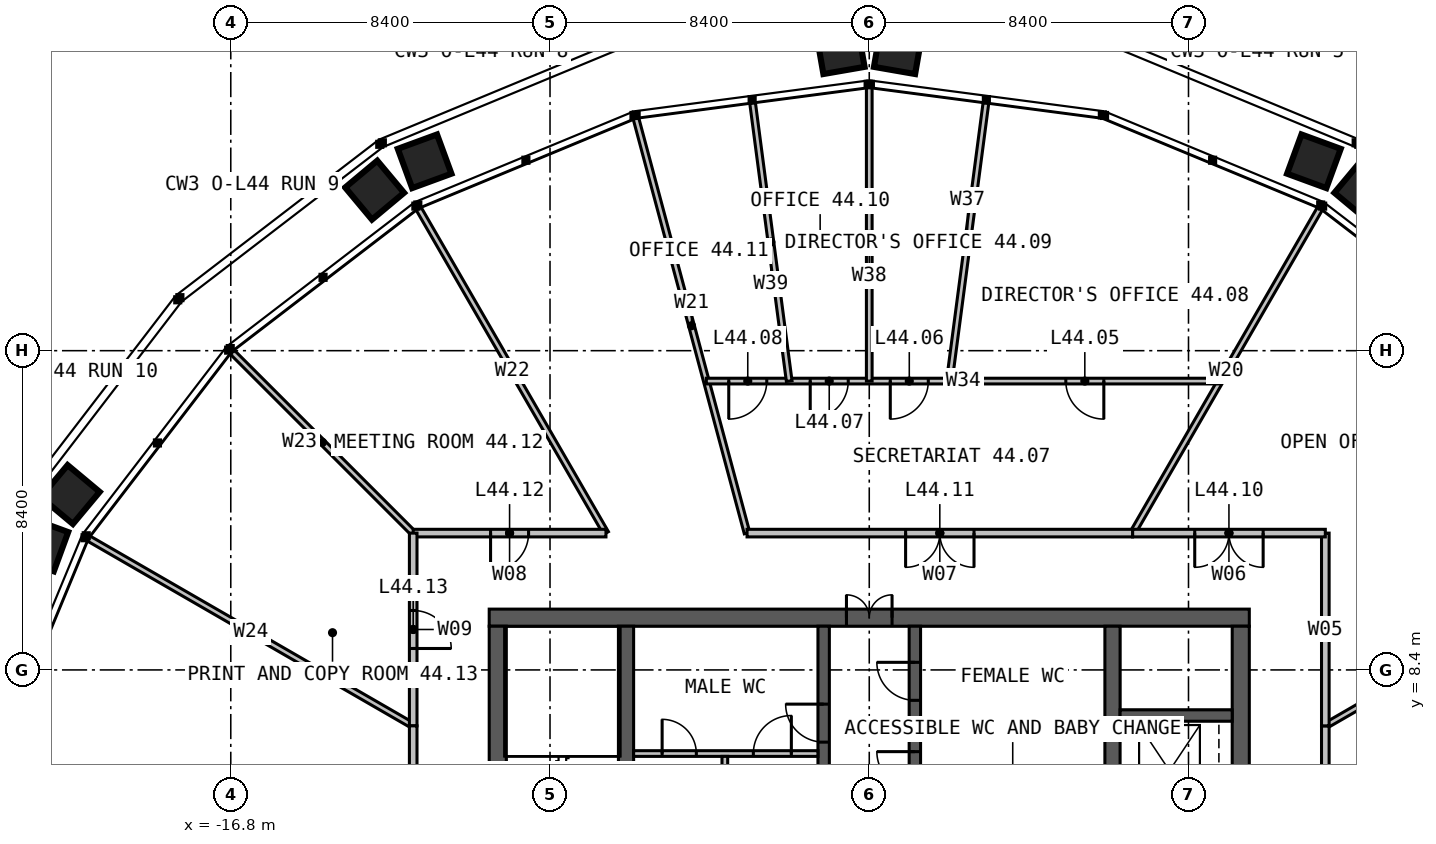
"""IFC4 building model, lengths in metres.
Left out: names, types, materials, properties, quantities, classifications, styles, units other than length and angle.
Written with IfcOpenShell. Run it as: python <this file> out.ifc"""

import sys

from ifc_helpers import new_model, si_unit, direction, frame, frame_2d, origin, place, context, subcontext, project, spatial, rectangle, extrude, element, fill, save


model = new_model("IFC4")
c1 = context("Model", 3, precision=1e-05, world=origin(), true_north=direction((0.0, 1.0)))
c2 = subcontext(c1, "Body", "Model", "MODEL_VIEW")
j1 = project(units=[si_unit("LENGTHUNIT", "METRE"), si_unit("PLANEANGLEUNIT", "RADIAN")], contexts=[c1])
p1 = place(None, origin())
s1 = spatial("IfcSite", under=j1, at=p1, CompositionType="ELEMENT")
p2 = place(p1, origin())
s2 = spatial("IfcBuilding", under=s1, at=p2, CompositionType="ELEMENT")
p3 = place(p2, frame((0.0, 0.0, 183.0)))
s3 = spatial("IfcBuildingStorey", under=s2, at=p3, CompositionType="ELEMENT", Elevation=183.0)
p4 = place(p3, frame((-10.0, 9.775, 0.0), z_axis=(0.0, 0.0, 1.0), x_axis=(1.0, 0.0, 0.0)))
e1 = element("IfcWall", 1, at=p4, inside=s3, PredefinedType="SOLIDWALL", context=c2, shape_type="SweptSolid", body=[
    extrude(rectangle(XDim=20.0, YDim=0.45, at=frame_2d((10.0, 0.0))), origin(), (0.0, 0.0, 1.0), 4.0),
])
p5 = place(p4, frame((9.4, 0.0, 0.0)))
e2 = element("IfcOpeningElement", 2, at=p5, cuts=e1, PredefinedType="OPENING", context=c2, shape_type="SweptSolid", body=[
    extrude(rectangle(XDim=1.2, YDim=2.2, at=frame_2d((0.6, 1.1))), frame((0.0, 0.235, 0.0), z_axis=(0.0, -1.0, 0.0), x_axis=(1.0, 0.0, 0.0)), (0.0, 0.0, 1.0), 0.47),
])
for number, where, z_axis, x_axis in (
    (3, (9.775, -9.55, 0.0), (0.0, 0.0, 1.0), (0.0, 1.0, 0.0)),
    (4, (-9.775, 9.55, 0.0), (0.0, 0.0, 1.0), (0.0, -1.0, 0.0)),
):
    element("IfcWall", number, at=place(p3, frame(where, z_axis=z_axis, x_axis=x_axis)), inside=s3, PredefinedType="SOLIDWALL", context=c2, shape_type="SweptSolid", body=[
        extrude(rectangle(XDim=19.1, YDim=0.45, at=frame_2d((9.55, 0.0))), origin(), (0.0, 0.0, 1.0), 4.0),
    ])
p6 = place(p3, frame((-6.4, -9.55, 0.0), z_axis=(0.0, 0.0, 1.0), x_axis=(0.0, 1.0, 0.0)))
e5 = element("IfcWall", 5, at=p6, inside=s3, PredefinedType="SOLIDWALL", context=c2, shape_type="SweptSolid", body=[
    extrude(rectangle(XDim=19.1, YDim=0.4, at=frame_2d((9.55, 0.0))), origin(), (0.0, 0.0, 1.0), 4.0),
])
p7 = place(p6, frame((9.05, 0.0, 0.0)))
e6 = element("IfcOpeningElement", 6, at=p7, cuts=e5, PredefinedType="OPENING", context=c2, shape_type="SweptSolid", body=[
    extrude(rectangle(XDim=1.0, YDim=2.2, at=frame_2d((0.5, 1.1))), frame((0.0, 0.21, 0.0), z_axis=(0.0, -1.0, 0.0), x_axis=(1.0, 0.0, 0.0)), (0.0, 0.0, 1.0), 0.42),
])
p8 = place(p3, frame((6.4, 9.55, 0.0), z_axis=(0.0, 0.0, 1.0), x_axis=(0.0, -1.0, 0.0)))
e7 = element("IfcWall", 7, at=p8, inside=s3, PredefinedType="SOLIDWALL", context=c2, shape_type="SweptSolid", body=[
    extrude(rectangle(XDim=19.1, YDim=0.4, at=frame_2d((9.55, 0.0))), origin(), (0.0, 0.0, 1.0), 4.0),
])
p9 = place(p8, frame((9.05, 0.0, 0.0)))
e8 = element("IfcOpeningElement", 8, at=p9, cuts=e7, PredefinedType="OPENING", context=c2, shape_type="SweptSolid", body=[
    extrude(rectangle(XDim=1.0, YDim=2.2, at=frame_2d((0.5, 1.1))), frame((0.0, 0.21, 0.0), z_axis=(0.0, -1.0, 0.0), x_axis=(1.0, 0.0, 0.0)), (0.0, 0.0, 1.0), 0.42),
])
p10 = place(p3, frame((-1.2, 1.45, 0.0), z_axis=(0.0, 0.0, 1.0), x_axis=(0.0, 1.0, 0.0)))
e9 = element("IfcWall", 9, at=p10, inside=s3, PredefinedType="SOLIDWALL", context=c2, shape_type="SweptSolid", body=[
    extrude(rectangle(XDim=8.1, YDim=0.3, at=frame_2d((4.05, 0.0))), origin(), (0.0, 0.0, 1.0), 4.0),
])
p11 = place(p10, frame((5.05, 0.0, 0.0)))
e10 = element("IfcOpeningElement", 10, at=p11, cuts=e9, PredefinedType="OPENING", context=c2, shape_type="SweptSolid", body=[
    extrude(rectangle(XDim=1.0, YDim=2.2, at=frame_2d((0.5, 1.1))), frame((0.0, 0.16, 0.0), z_axis=(0.0, -1.0, 0.0), x_axis=(1.0, 0.0, 0.0)), (0.0, 0.0, 1.0), 0.32),
])
p12 = place(p3, frame((1.2, 1.45, 0.0), z_axis=(0.0, 0.0, 1.0), x_axis=(0.0, 1.0, 0.0)))
e11 = element("IfcWall", 11, at=p12, inside=s3, PredefinedType="SOLIDWALL", context=c2, shape_type="SweptSolid", body=[
    extrude(rectangle(XDim=8.1, YDim=0.3, at=frame_2d((4.05, 0.0))), origin(), (0.0, 0.0, 1.0), 4.0),
])
p13 = place(p12, frame((3.8, 0.0, 0.0)))
e12 = element("IfcOpeningElement", 12, at=p13, cuts=e11, PredefinedType="OPENING", context=c2, shape_type="SweptSolid", body=[
    extrude(rectangle(XDim=1.0, YDim=2.2, at=frame_2d((0.5, 1.1))), frame((0.0, 0.16, 0.0), z_axis=(0.0, -1.0, 0.0), x_axis=(1.0, 0.0, 0.0)), (0.0, 0.0, 1.0), 0.32),
])
p14 = place(p12, frame((6.15, 0.0, 0.0)))
e13 = element("IfcOpeningElement", 13, at=p14, cuts=e11, PredefinedType="OPENING", context=c2, shape_type="SweptSolid", body=[
    extrude(rectangle(XDim=1.0, YDim=2.2, at=frame_2d((0.5, 1.1))), frame((0.0, 0.16, 0.0), z_axis=(0.0, -1.0, 0.0), x_axis=(1.0, 0.0, 0.0)), (0.0, 0.0, 1.0), 0.32),
])
p15 = place(p3, frame((6.6, 7.2, 0.0), z_axis=(0.0, 0.0, 1.0), x_axis=(1.0, 0.0, 0.0)))
e14 = element("IfcWall", 14, at=p15, inside=s3, PredefinedType="SOLIDWALL", context=c2, shape_type="SweptSolid", body=[
    extrude(rectangle(XDim=2.95, YDim=0.3, at=frame_2d((1.475, 0.0))), origin(), (0.0, 0.0, 1.0), 4.0),
])
p16 = place(p3, frame((1.35, 6.8, 0.0), z_axis=(0.0, 0.0, 1.0), x_axis=(1.0, 0.0, 0.0)))
e15 = element("IfcWall", 15, at=p16, inside=s3, PredefinedType="PARTITIONING", context=c2, shape_type="SweptSolid", body=[
    extrude(rectangle(XDim=4.85, YDim=0.15, at=frame_2d((2.425, 0.0))), origin(), (0.0, 0.0, 1.0), 3.75),
])
p17 = place(p3, frame((-6.2, 6.2, 0.0), z_axis=(0.0, 0.0, 1.0), x_axis=(1.0, 0.0, 0.0)))
e16 = element("IfcWall", 16, at=p17, inside=s3, PredefinedType="PARTITIONING", context=c2, shape_type="SweptSolid", body=[
    extrude(rectangle(XDim=4.85, YDim=0.15, at=frame_2d((2.425, 0.0))), origin(), (0.0, 0.0, 1.0), 3.75),
])
p18 = place(p17, frame((3.15, 0.0, 0.0)))
e17 = element("IfcOpeningElement", 17, at=p18, cuts=e16, PredefinedType="OPENING", context=c2, shape_type="SweptSolid", body=[
    extrude(rectangle(XDim=1.0, YDim=2.2, at=frame_2d((0.5, 1.1))), frame((0.0, 0.085, 0.0), z_axis=(0.0, -1.0, 0.0), x_axis=(1.0, 0.0, 0.0)), (0.0, 0.0, 1.0), 0.17),
])
p19 = place(p17, frame((0.75, 0.0, 0.0)))
e18 = element("IfcOpeningElement", 18, at=p19, cuts=e16, PredefinedType="OPENING", context=c2, shape_type="SweptSolid", body=[
    extrude(rectangle(XDim=0.9, YDim=2.2, at=frame_2d((0.45, 1.1))), frame((0.0, 0.085, 0.0), z_axis=(0.0, -1.0, 0.0), x_axis=(1.0, 0.0, 0.0)), (0.0, 0.0, 1.0), 0.17),
])
p20 = place(p3, frame((-3.8, 4.75, 0.0), z_axis=(0.0, 0.0, 1.0), x_axis=(0.0, 1.0, 0.0)))
e19 = element("IfcWall", 19, at=p20, inside=s3, PredefinedType="PARTITIONING", context=c2, shape_type="SweptSolid", body=[
    extrude(rectangle(XDim=1.375, YDim=0.15, at=frame_2d((0.688, 0.0))), origin(), (0.0, 0.0, 1.0), 3.75),
])
for number, where, z_axis, x_axis in (
    (20, (12.0, 6.928, 0.0), (0.0, 0.0, 1.0), (0.866, 0.5, 0.0)),
    (21, (6.928, 12.0, 0.0), (0.0, 0.0, 1.0), (0.5, 0.866, 0.0)),
):
    element("IfcWall", number, at=place(p3, frame(where, z_axis=z_axis, x_axis=x_axis)), inside=s3, PredefinedType="PARTITIONING", context=c2, shape_type="SweptSolid", body=[
        extrude(rectangle(XDim=9.865, YDim=0.15, at=frame_2d((4.932, 0.0))), origin(), (0.0, 0.0, 1.0), 2.79),
    ])
p21 = place(p3, frame((-3.215, 12.0, 0.0), z_axis=(0.0, 0.0, 1.0), x_axis=(-0.258817816178, 0.965926155577, 0.0)))
e22 = element("IfcWall", 22, at=p21, inside=s3, PredefinedType="PARTITIONING", context=c2, shape_type="SweptSolid", body=[
    extrude(rectangle(XDim=11.298, YDim=0.15, at=frame_2d((5.649, 0.0))), origin(), (0.0, 0.0, 1.0), 2.79),
])
p22 = place(p3, frame((-6.928, 12.0, 0.0), z_axis=(0.0, 0.0, 1.0), x_axis=(-0.49999595416, 0.866027739639, 0.0)))
e23 = element("IfcWall", 23, at=p22, inside=s3, PredefinedType="PARTITIONING", context=c2, shape_type="SweptSolid", body=[
    extrude(rectangle(XDim=9.865, YDim=0.15, at=frame_2d((4.932, 0.0))), origin(), (0.0, 0.0, 1.0), 2.79),
])
p23 = place(p3, frame((-12.0, 12.0, 0.0), z_axis=(0.0, 0.0, 1.0), x_axis=(-0.707106781187, 0.707106781187, 0.0)))
e24 = element("IfcWall", 24, at=p23, inside=s3, PredefinedType="PARTITIONING", context=c2, shape_type="SweptSolid", body=[
    extrude(rectangle(XDim=6.751, YDim=0.15, at=frame_2d((3.375, 0.0))), origin(), (0.0, 0.0, 1.0), 2.79),
])
p24 = place(p3, frame((-12.0, 6.928, 0.0), z_axis=(0.0, 0.0, 1.0), x_axis=(-0.866027739639, 0.49999595416, 0.0)))
e25 = element("IfcWall", 25, at=p24, inside=s3, PredefinedType="PARTITIONING", context=c2, shape_type="SweptSolid", body=[
    extrude(rectangle(XDim=9.865, YDim=0.15, at=frame_2d((4.932, 0.0))), origin(), (0.0, 0.0, 1.0), 2.79),
])
p25 = place(p3, frame((12.0, -6.928, 0.0), z_axis=(0.0, 0.0, 1.0), x_axis=(0.0, 1.0, 0.0)))
e26 = element("IfcWall", 26, at=p25, inside=s3, PredefinedType="PARTITIONING", context=c2, shape_type="SweptSolid", body=[
    extrude(rectangle(XDim=13.856, YDim=0.2, at=frame_2d((6.928, 0.0))), origin(), (0.0, 0.0, 1.0), 3.8),
])
p26 = place(p25, frame((6.028, 0.0, 0.0)))
e27 = element("IfcOpeningElement", 27, at=p26, cuts=e26, PredefinedType="OPENING", context=c2, shape_type="SweptSolid", body=[
    extrude(rectangle(XDim=1.8, YDim=2.2, at=frame_2d((0.9, 1.1))), frame((0.0, 0.11, 0.0), z_axis=(0.0, -1.0, 0.0), x_axis=(1.0, 0.0, 0.0)), (0.0, 0.0, 1.0), 0.22),
])
p27 = place(p3, frame((12.0, 6.928, 0.0), z_axis=(0.0, 0.0, 1.0), x_axis=(0.0, 1.0, 0.0)))
e28 = element("IfcWall", 28, at=p27, inside=s3, PredefinedType="PARTITIONING", context=c2, shape_type="SweptSolid", body=[
    extrude(rectangle(XDim=5.072, YDim=0.2, at=frame_2d((2.536, 0.0))), origin(), (0.0, 0.0, 1.0), 3.8),
])
p28 = place(p3, frame((12.0, 12.0, 0.0), z_axis=(0.0, 0.0, 1.0), x_axis=(-1.0, 0.0, 0.0)))
e29 = element("IfcWall", 29, at=p28, inside=s3, PredefinedType="PARTITIONING", context=c2, shape_type="SweptSolid", body=[
    extrude(rectangle(XDim=5.072, YDim=0.2, at=frame_2d((2.536, 0.0))), origin(), (0.0, 0.0, 1.0), 3.8),
])
p29 = place(p28, frame((1.636, 0.0, 0.0)))
e30 = element("IfcOpeningElement", 30, at=p29, cuts=e29, PredefinedType="OPENING", context=c2, shape_type="SweptSolid", body=[
    extrude(rectangle(XDim=1.8, YDim=2.2, at=frame_2d((0.9, 1.1))), frame((0.0, 0.11, 0.0), z_axis=(0.0, -1.0, 0.0), x_axis=(1.0, 0.0, 0.0)), (0.0, 0.0, 1.0), 0.22),
])
p30 = place(p3, frame((9.238, 16.0, 0.0), z_axis=(0.0, 0.0, 1.0), x_axis=(-1.0, 0.0, 0.0)))
e31 = element("IfcWall", 31, at=p30, inside=s3, PredefinedType="PARTITIONING", context=c2, shape_type="SweptSolid", body=[
    extrude(rectangle(XDim=13.525, YDim=0.15, at=frame_2d((6.762, 0.0))), origin(), (0.0, 0.0, 1.0), 2.79),
])
p31 = place(p30, frame((3.066, 0.0, 0.0)))
e32 = element("IfcOpeningElement", 32, at=p31, cuts=e31, PredefinedType="OPENING", context=c2, shape_type="SweptSolid", body=[
    extrude(rectangle(XDim=1.0, YDim=2.2, at=frame_2d((0.5, 1.1))), frame((0.0, 0.085, 0.0), z_axis=(0.0, -1.0, 0.0), x_axis=(1.0, 0.0, 0.0)), (0.0, 0.0, 1.0), 0.17),
])
p32 = place(p30, frame((7.684, 0.0, 0.0)))
e33 = element("IfcOpeningElement", 33, at=p32, cuts=e31, PredefinedType="OPENING", context=c2, shape_type="SweptSolid", body=[
    extrude(rectangle(XDim=1.0, YDim=2.2, at=frame_2d((0.5, 1.1))), frame((0.0, 0.085, 0.0), z_axis=(0.0, -1.0, 0.0), x_axis=(1.0, 0.0, 0.0)), (0.0, 0.0, 1.0), 0.17),
])
p33 = place(p30, frame((9.791, 0.0, 0.0)))
e34 = element("IfcOpeningElement", 34, at=p33, cuts=e31, PredefinedType="OPENING", context=c2, shape_type="SweptSolid", body=[
    extrude(rectangle(XDim=1.0, YDim=2.2, at=frame_2d((0.5, 1.1))), frame((0.0, 0.085, 0.0), z_axis=(0.0, -1.0, 0.0), x_axis=(1.0, 0.0, 0.0)), (0.0, 0.0, 1.0), 0.17),
])
p34 = place(p30, frame((11.934, 0.0, 0.0)))
e35 = element("IfcOpeningElement", 35, at=p34, cuts=e31, PredefinedType="OPENING", context=c2, shape_type="SweptSolid", body=[
    extrude(rectangle(XDim=1.0, YDim=2.2, at=frame_2d((0.5, 1.1))), frame((0.0, 0.085, 0.0), z_axis=(0.0, -1.0, 0.0), x_axis=(1.0, 0.0, 0.0)), (0.0, 0.0, 1.0), 0.17),
])
p35 = place(p3, frame((2.106, 16.0, 0.0), z_axis=(0.0, 0.0, 1.0), x_axis=(0.130534093561, 0.991443821111, 0.0)))
e36 = element("IfcWall", 36, at=p35, inside=s3, PredefinedType="PARTITIONING", context=c2, shape_type="SweptSolid", body=[
    extrude(rectangle(XDim=7.38, YDim=0.15, at=frame_2d((3.69, 0.0))), origin(), (0.0, 0.0, 1.0), 2.79),
])
p36 = place(p3, frame((0.0, 16.0, 0.0), z_axis=(0.0, 0.0, 1.0), x_axis=(0.0, 1.0, 0.0)))
e37 = element("IfcWall", 37, at=p36, inside=s3, PredefinedType="PARTITIONING", context=c2, shape_type="SweptSolid", body=[
    extrude(rectangle(XDim=7.721, YDim=0.15, at=frame_2d((3.861, 0.0))), origin(), (0.0, 0.0, 1.0), 2.79),
])
p37 = place(p3, frame((-2.106, 16.0, 0.0), z_axis=(0.0, 0.0, 1.0), x_axis=(-0.130534093561, 0.991443821111, 0.0)))
e38 = element("IfcWall", 38, at=p37, inside=s3, PredefinedType="PARTITIONING", context=c2, shape_type="SweptSolid", body=[
    extrude(rectangle(XDim=7.38, YDim=0.15, at=frame_2d((3.69, 0.0))), origin(), (0.0, 0.0, 1.0), 2.79),
])
p38 = place(p3, frame((6.928, 12.0, 0.0), z_axis=(0.0, 0.0, 1.0), x_axis=(-1.0, 0.0, 0.0)))
e39 = element("IfcWall", 39, at=p38, inside=s3, PredefinedType="PARTITIONING", context=c2, shape_type="SweptSolid", body=[
    extrude(rectangle(XDim=10.144, YDim=0.2, at=frame_2d((5.072, 0.0))), origin(), (0.0, 0.0, 1.0), 3.8),
])
p39 = place(p38, frame((4.172, 0.0, 0.0)))
e40 = element("IfcOpeningElement", 40, at=p39, cuts=e39, PredefinedType="OPENING", context=c2, shape_type="SweptSolid", body=[
    extrude(rectangle(XDim=1.8, YDim=2.2, at=frame_2d((0.9, 1.1))), frame((0.0, 0.11, 0.0), z_axis=(0.0, -1.0, 0.0), x_axis=(1.0, 0.0, 0.0)), (0.0, 0.0, 1.0), 0.22),
])
p40 = place(p3, frame((-6.928, 12.0, 0.0), z_axis=(0.0, 0.0, 1.0), x_axis=(-1.0, 0.0, 0.0)))
e41 = element("IfcWall", 41, at=p40, inside=s3, PredefinedType="PARTITIONING", context=c2, shape_type="SweptSolid", body=[
    extrude(rectangle(XDim=5.072, YDim=0.2, at=frame_2d((2.536, 0.0))), origin(), (0.0, 0.0, 1.0), 3.8),
])
p41 = place(p40, frame((2.036, 0.0, 0.0)))
e42 = element("IfcOpeningElement", 42, at=p41, cuts=e41, PredefinedType="OPENING", context=c2, shape_type="SweptSolid", body=[
    extrude(rectangle(XDim=1.0, YDim=2.2, at=frame_2d((0.5, 1.1))), frame((0.0, 0.11, 0.0), z_axis=(0.0, -1.0, 0.0), x_axis=(1.0, 0.0, 0.0)), (0.0, 0.0, 1.0), 0.22),
])
p42 = place(p3, frame((-12.0, 12.0, 0.0), z_axis=(0.0, 0.0, 1.0), x_axis=(0.0, -1.0, 0.0)))
e43 = element("IfcWall", 43, at=p42, inside=s3, PredefinedType="PARTITIONING", context=c2, shape_type="SweptSolid", body=[
    extrude(rectangle(XDim=5.072, YDim=0.2, at=frame_2d((2.536, 0.0))), origin(), (0.0, 0.0, 1.0), 3.8),
])
p43 = place(p42, frame((2.036, 0.0, 0.0)))
e44 = element("IfcOpeningElement", 44, at=p43, cuts=e43, PredefinedType="OPENING", context=c2, shape_type="SweptSolid", body=[
    extrude(rectangle(XDim=1.0, YDim=2.2, at=frame_2d((0.5, 1.1))), frame((0.0, 0.11, 0.0), z_axis=(0.0, -1.0, 0.0), x_axis=(1.0, 0.0, 0.0)), (0.0, 0.0, 1.0), 0.22),
])
p44 = place(p3, frame((-12.0, 6.928, 0.0), z_axis=(0.0, 0.0, 1.0), x_axis=(0.0, -1.0, 0.0)))
e45 = element("IfcWall", 45, at=p44, inside=s3, PredefinedType="PARTITIONING", context=c2, shape_type="SweptSolid", body=[
    extrude(rectangle(XDim=10.144, YDim=0.2, at=frame_2d((5.072, 0.0))), origin(), (0.0, 0.0, 1.0), 3.8),
])
p45 = place(p44, frame((4.172, 0.0, 0.0)))
e46 = element("IfcOpeningElement", 46, at=p45, cuts=e45, PredefinedType="OPENING", context=c2, shape_type="SweptSolid", body=[
    extrude(rectangle(XDim=1.8, YDim=2.2, at=frame_2d((0.9, 1.1))), frame((0.0, 0.11, 0.0), z_axis=(0.0, -1.0, 0.0), x_axis=(1.0, 0.0, 0.0)), (0.0, 0.0, 1.0), 0.22),
])
p46 = place(p5, origin())
e47 = element("IfcDoor", 47, at=p46, inside=s3, OperationType="DOUBLE_DOOR_SINGLE_SWING", PredefinedType="DOOR", context=c2, shape_type="SweptSolid", body=[
    extrude(rectangle(XDim=1.2, YDim=2.2, at=frame_2d((0.6, 1.1))), frame((0.0, 0.025, 0.0), z_axis=(0.0, -1.0, 0.0), x_axis=(1.0, 0.0, 0.0)), (0.0, 0.0, 1.0), 0.05),
])
fill(e2, e47)
p47 = place(p11, origin())
e48 = element("IfcDoor", 48, at=p47, inside=s3, OperationType="SINGLE_SWING_RIGHT", PredefinedType="DOOR", context=c2, shape_type="SweptSolid", body=[
    extrude(rectangle(XDim=1.0, YDim=2.2, at=frame_2d((0.5, 1.1))), frame((0.0, 0.025, 0.0), z_axis=(0.0, -1.0, 0.0), x_axis=(1.0, 0.0, 0.0)), (0.0, 0.0, 1.0), 0.05),
])
fill(e10, e48)
p48 = place(p13, origin())
e49 = element("IfcDoor", 49, at=p48, inside=s3, OperationType="SINGLE_SWING_RIGHT", PredefinedType="DOOR", context=c2, shape_type="SweptSolid", body=[
    extrude(rectangle(XDim=1.0, YDim=2.2, at=frame_2d((0.5, 1.1))), frame((0.0, 0.025, 0.0), z_axis=(0.0, -1.0, 0.0), x_axis=(1.0, 0.0, 0.0)), (0.0, 0.0, 1.0), 0.05),
])
fill(e12, e49)
p49 = place(p14, origin())
e50 = element("IfcDoor", 50, at=p49, inside=s3, OperationType="SINGLE_SWING_RIGHT", PredefinedType="DOOR", context=c2, shape_type="SweptSolid", body=[
    extrude(rectangle(XDim=1.0, YDim=2.2, at=frame_2d((0.5, 1.1))), frame((0.0, 0.025, 0.0), z_axis=(0.0, -1.0, 0.0), x_axis=(1.0, 0.0, 0.0)), (0.0, 0.0, 1.0), 0.05),
])
fill(e13, e50)
p50 = place(p18, origin())
e51 = element("IfcDoor", 51, at=p50, inside=s3, OperationType="SINGLE_SWING_RIGHT", PredefinedType="DOOR", context=c2, shape_type="SweptSolid", body=[
    extrude(rectangle(XDim=1.0, YDim=2.2, at=frame_2d((0.5, 1.1))), frame((0.0, 0.025, 0.0), z_axis=(0.0, -1.0, 0.0), x_axis=(1.0, 0.0, 0.0)), (0.0, 0.0, 1.0), 0.05),
])
fill(e17, e51)
p51 = place(p19, origin())
e52 = element("IfcDoor", 52, at=p51, inside=s3, OperationType="SINGLE_SWING_LEFT", PredefinedType="DOOR", context=c2, shape_type="SweptSolid", body=[
    extrude(rectangle(XDim=0.9, YDim=2.2, at=frame_2d((0.45, 1.1))), frame((0.0, 0.025, 0.0), z_axis=(0.0, -1.0, 0.0), x_axis=(1.0, 0.0, 0.0)), (0.0, 0.0, 1.0), 0.05),
])
fill(e18, e52)
p52 = place(p29, origin())
e53 = element("IfcDoor", 53, at=p52, inside=s3, OperationType="DOUBLE_DOOR_SINGLE_SWING", PredefinedType="DOOR", context=c2, shape_type="SweptSolid", body=[
    extrude(rectangle(XDim=1.8, YDim=2.2, at=frame_2d((0.9, 1.1))), frame((0.0, 0.025, 0.0), z_axis=(0.0, -1.0, 0.0), x_axis=(1.0, 0.0, 0.0)), (0.0, 0.0, 1.0), 0.05),
])
fill(e30, e53)
p53 = place(p31, origin())
e54 = element("IfcDoor", 54, at=p53, inside=s3, OperationType="SINGLE_SWING_LEFT", PredefinedType="DOOR", context=c2, shape_type="SweptSolid", body=[
    extrude(rectangle(XDim=1.0, YDim=2.2, at=frame_2d((0.5, 1.1))), frame((0.0, 0.025, 0.0), z_axis=(0.0, -1.0, 0.0), x_axis=(1.0, 0.0, 0.0)), (0.0, 0.0, 1.0), 0.05),
])
fill(e32, e54)
p54 = place(p32, origin())
e55 = element("IfcDoor", 55, at=p54, inside=s3, OperationType="SINGLE_SWING_RIGHT", PredefinedType="DOOR", context=c2, shape_type="SweptSolid", body=[
    extrude(rectangle(XDim=1.0, YDim=2.2, at=frame_2d((0.5, 1.1))), frame((0.0, 0.025, 0.0), z_axis=(0.0, -1.0, 0.0), x_axis=(1.0, 0.0, 0.0)), (0.0, 0.0, 1.0), 0.05),
])
fill(e33, e55)
p55 = place(p33, origin())
e56 = element("IfcDoor", 56, at=p55, inside=s3, OperationType="SINGLE_SWING_RIGHT", PredefinedType="DOOR", context=c2, shape_type="SweptSolid", body=[
    extrude(rectangle(XDim=1.0, YDim=2.2, at=frame_2d((0.5, 1.1))), frame((0.0, 0.025, 0.0), z_axis=(0.0, -1.0, 0.0), x_axis=(1.0, 0.0, 0.0)), (0.0, 0.0, 1.0), 0.05),
])
fill(e34, e56)
p56 = place(p34, origin())
e57 = element("IfcDoor", 57, at=p56, inside=s3, OperationType="SINGLE_SWING_RIGHT", PredefinedType="DOOR", context=c2, shape_type="SweptSolid", body=[
    extrude(rectangle(XDim=1.0, YDim=2.2, at=frame_2d((0.5, 1.1))), frame((0.0, 0.025, 0.0), z_axis=(0.0, -1.0, 0.0), x_axis=(1.0, 0.0, 0.0)), (0.0, 0.0, 1.0), 0.05),
])
fill(e35, e57)
p57 = place(p39, origin())
e58 = element("IfcDoor", 58, at=p57, inside=s3, OperationType="DOUBLE_DOOR_SINGLE_SWING", PredefinedType="DOOR", context=c2, shape_type="SweptSolid", body=[
    extrude(rectangle(XDim=1.8, YDim=2.2, at=frame_2d((0.9, 1.1))), frame((0.0, 0.025, 0.0), z_axis=(0.0, -1.0, 0.0), x_axis=(1.0, 0.0, 0.0)), (0.0, 0.0, 1.0), 0.05),
])
fill(e40, e58)
p58 = place(p41, origin())
e59 = element("IfcDoor", 59, at=p58, inside=s3, OperationType="SINGLE_SWING_RIGHT", PredefinedType="DOOR", context=c2, shape_type="SweptSolid", body=[
    extrude(rectangle(XDim=1.0, YDim=2.2, at=frame_2d((0.5, 1.1))), frame((0.0, 0.025, 0.0), z_axis=(0.0, -1.0, 0.0), x_axis=(1.0, 0.0, 0.0)), (0.0, 0.0, 1.0), 0.05),
])
fill(e42, e59)
p59 = place(p43, origin())
e60 = element("IfcDoor", 60, at=p59, inside=s3, OperationType="SINGLE_SWING_RIGHT", PredefinedType="DOOR", context=c2, shape_type="SweptSolid", body=[
    extrude(rectangle(XDim=1.0, YDim=2.2, at=frame_2d((0.5, 1.1))), frame((0.0, 0.025, 0.0), z_axis=(0.0, -1.0, 0.0), x_axis=(1.0, 0.0, 0.0)), (0.0, 0.0, 1.0), 0.05),
])
fill(e44, e60)
save(model, sys.argv[1])
